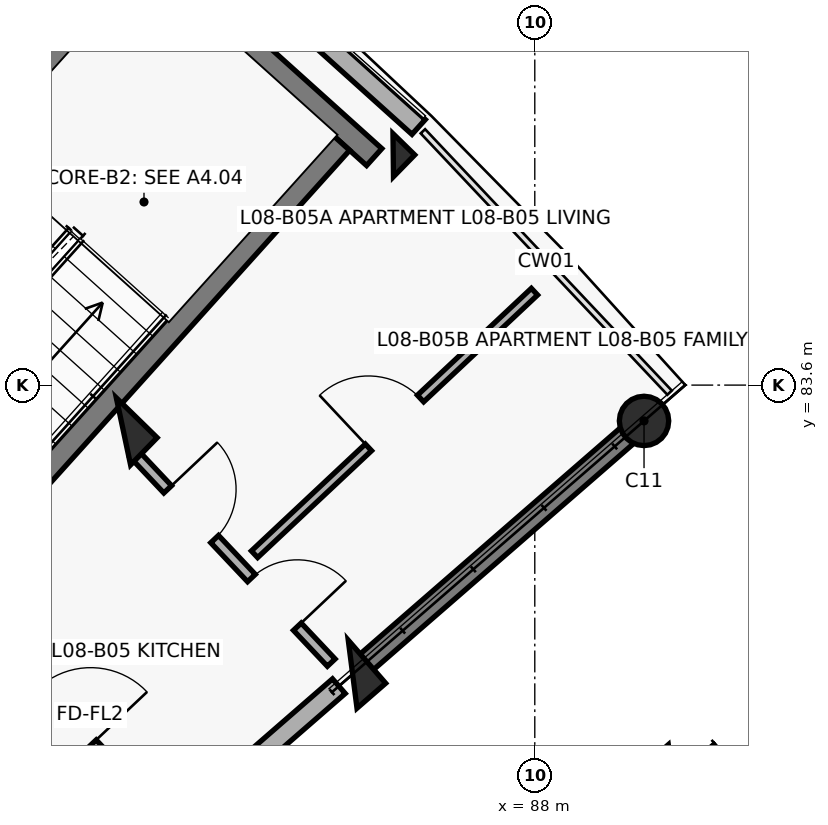
"""IFC4 building model, lengths in metres.
Left out: names, types, materials, properties, quantities, classifications, styles, units other than length and angle.
Written with IfcOpenShell. Run it as: python <this file> out.ifc"""

import sys

from ifc_helpers import new_model, si_unit, direction, frame, frame_2d, origin, origin_2d, place, context, subcontext, project, spatial, rectangle, circle, extrude, element, fill, save


model = new_model("IFC4")
c1 = context("Model", 3, precision=1e-05, world=origin(), true_north=direction((0.0, 1.0)))
c2 = subcontext(c1, "Body", "Model", "MODEL_VIEW")
j1 = project(units=[si_unit("LENGTHUNIT", "METRE"), si_unit("PLANEANGLEUNIT", "RADIAN")], contexts=[c1])
p1 = place(None, origin())
s1 = spatial("IfcSite", under=j1, at=p1, CompositionType="ELEMENT")
p2 = place(p1, origin())
s2 = spatial("IfcBuilding", under=s1, at=p2, CompositionType="ELEMENT")
p3 = place(p2, frame((0.0, 0.0, 26.7)))
s3 = spatial("IfcBuildingStorey", under=s2, at=p3, CompositionType="ELEMENT", Elevation=26.7)
p4 = place(p3, frame((82.588, 82.991, 0.0), z_axis=(0.0, 0.0, 1.0), x_axis=(0.698665066769, 0.715448897181, 0.0)))
e1 = element("IfcColumn", 1, at=p4, inside=s3, PredefinedType="COLUMN", context=c2, shape_type="SweptSolid", body=[
    extrude(rectangle(XDim=0.5, YDim=0.75, at=origin_2d()), origin(), (0.0, 0.0, 1.0), 3.1),
])
p5 = place(p3, frame((86.137, 86.626, 0.0), z_axis=(0.0, 0.0, 1.0), x_axis=(0.698665066769, 0.715448897181, 0.0)))
e2 = element("IfcColumn", 2, at=p5, inside=s3, PredefinedType="COLUMN", context=c2, shape_type="SweptSolid", body=[
    extrude(rectangle(XDim=0.4, YDim=0.4, at=origin_2d()), origin(), (0.0, 0.0, 1.0), 3.1),
])
p6 = place(p3, frame((85.603, 79.796, 0.0), z_axis=(0.0, 0.0, 1.0), x_axis=(0.754709580223, 0.656059028991, 0.0)))
e3 = element("IfcColumn", 3, at=p6, inside=s3, PredefinedType="COLUMN", context=c2, shape_type="SweptSolid", body=[
    extrude(rectangle(XDim=0.5, YDim=0.75, at=origin_2d()), origin(), (0.0, 0.0, 1.0), 3.1),
])
p7 = place(p3, frame((89.437, 83.129, 0.0), z_axis=(0.0, 0.0, 1.0), x_axis=(0.754709580223, 0.656059028991, 0.0)))
e4 = element("IfcColumn", 4, at=p7, inside=s3, PredefinedType="COLUMN", context=c2, shape_type="SweptSolid", body=[
    extrude(circle(Radius=0.325, at=origin_2d()), origin(), (0.0, 0.0, 1.0), 3.1),
])
p8 = place(p3, frame((85.739, 79.914, 0.0), z_axis=(0.0, 0.0, 1.0), x_axis=(0.754703505217, 0.65606601742, 0.0)))
e5 = element("IfcWall", 5, at=p8, inside=s3, PredefinedType="SHEAR", context=c2, shape_type="SweptSolid", body=[
    extrude(rectangle(XDim=4.72, YDim=0.27, at=frame_2d((2.36, 0.0))), origin(), (0.0, 0.0, 1.0), 2.86),
])
p9 = place(p3, frame((89.814, 78.422, 0.0), z_axis=(0.0, 0.0, 1.0), x_axis=(-0.754709580223, -0.656059028991, 0.0)))
e6 = element("IfcColumn", 6, at=p9, inside=s3, PredefinedType="COLUMN", context=c2, shape_type="SweptSolid", body=[
    extrude(rectangle(XDim=0.5, YDim=0.75, at=origin_2d()), origin(), (0.0, 0.0, 1.0), 3.1),
])
p10 = place(p3, frame((82.897, 90.213, 0.0), z_axis=(0.0, 0.0, 1.0), x_axis=(0.743387539862, -0.668860946369, 0.0)))
e7 = element("IfcWall", 7, at=p10, inside=s3, PredefinedType="SOLIDWALL", context=c2, shape_type="SweptSolid", body=[
    extrude(rectangle(XDim=4.809, YDim=0.262, at=frame_2d((2.405, 0.0))), origin(), (0.0, 0.0, 1.0), 2.25),
])
p11 = place(p3, frame((79.234, 74.259, 0.0), z_axis=(0.0, 0.0, 1.0), x_axis=(0.754717680958, 0.656049710044, 0.0)))
e8 = element("IfcWall", 8, at=p11, inside=s3, PredefinedType="SOLIDWALL", context=c2, shape_type="SweptSolid", body=[
    extrude(rectangle(XDim=8.2, YDim=0.255, at=frame_2d((4.1, 0.0))), origin(), (0.0, 0.0, 1.0), 2.18),
])
p12 = place(p11, frame((3.59, 0.0, 0.75)))
e9 = element("IfcOpeningElement", 9, at=p12, cuts=e8, PredefinedType="OPENING", context=c2, shape_type="SweptSolid", body=[
    extrude(rectangle(XDim=1.35, YDim=1.35, at=frame_2d((0.675, 0.675))), frame((0.0, 0.137, 0.0), z_axis=(0.0, -1.0, 0.0), x_axis=(1.0, 0.0, 0.0)), (0.0, 0.0, 1.0), 0.275),
])
p13 = place(p3, frame((85.887, 86.601, 0.0), z_axis=(0.0, 0.0, 1.0), x_axis=(-0.743400052815, 0.668847038922, 0.0)))
e10 = element("IfcWall", 10, at=p13, inside=s3, PredefinedType="SHEAR", context=c2, shape_type="SweptSolid", body=[
    extrude(rectangle(XDim=4.47, YDim=0.3, at=frame_2d((2.235, 0.0))), origin(), (0.0, 0.0, 1.0), 3.1),
])
p14 = place(p3, frame((80.309, 81.073, 0.0), z_axis=(0.0, 0.0, 1.0), x_axis=(0.668885797871, 0.743365179038, 0.0)))
e11 = element("IfcWall", 11, at=p14, inside=s3, PredefinedType="SHEAR", context=c2, shape_type="SweptSolid", body=[
    extrude(rectangle(XDim=7.69, YDim=0.3, at=frame_2d((3.845, 0.0))), origin(), (0.0, 0.0, 1.0), 3.1),
])
p15 = place(p3, frame((77.655, 83.461, 0.0), z_axis=(0.0, 0.0, 1.0), x_axis=(0.668868253964, 0.743380964808, 0.0)))
e12 = element("IfcWall", 12, at=p15, inside=s3, PredefinedType="SHEAR", context=c2, shape_type="SweptSolid", body=[
    extrude(rectangle(XDim=7.69, YDim=0.3, at=frame_2d((3.845, 0.0))), origin(), (0.0, 0.0, 1.0), 3.1),
])
p16 = place(p3, frame((80.628, 80.483, 0.0), z_axis=(0.0, 0.0, 1.0), x_axis=(0.686310507227, -0.727308660522, 0.0)))
e13 = element("IfcWall", 13, at=p16, inside=s3, PredefinedType="SOLIDWALL", context=c2, shape_type="SweptSolid", body=[
    extrude(rectangle(XDim=3.436, YDim=0.2, at=frame_2d((1.718, 0.0))), origin(), (0.0, 0.0, 1.0), 2.08),
])
p17 = place(p16, frame((1.208, 0.0, 0.0)))
e14 = element("IfcOpeningElement", 14, at=p17, cuts=e13, PredefinedType="OPENING", context=c2, shape_type="SweptSolid", body=[
    extrude(rectangle(XDim=1.02, YDim=2.15, at=frame_2d((0.51, 1.075))), frame((0.0, 0.11, 0.0), z_axis=(0.0, -1.0, 0.0), x_axis=(1.0, 0.0, 0.0)), (0.0, 0.0, 1.0), 0.22),
])
p18 = place(p3, frame((82.724, 82.701, 0.0), z_axis=(0.0, 0.0, 1.0), x_axis=(0.686331812627, -0.72728855551, 0.0)))
e15 = element("IfcWall", 15, at=p18, inside=s3, PredefinedType="PARTITIONING", context=c2, shape_type="SweptSolid", body=[
    extrude(rectangle(XDim=3.785, YDim=0.14, at=frame_2d((1.893, 0.0))), origin(), (0.0, 0.0, 1.0), 2.08),
])
p19 = place(p18, frame((0.65, 0.0, 0.0)))
e16 = element("IfcOpeningElement", 16, at=p19, cuts=e15, PredefinedType="OPENING", context=c2, shape_type="SweptSolid", body=[
    extrude(rectangle(XDim=0.9, YDim=2.1, at=frame_2d((0.45, 1.05))), frame((0.0, 0.08, 0.0), z_axis=(0.0, -1.0, 0.0), x_axis=(1.0, 0.0, 0.0)), (0.0, 0.0, 1.0), 0.16),
])
p20 = place(p18, frame((2.255, 0.0, 0.0)))
e17 = element("IfcOpeningElement", 17, at=p20, cuts=e15, PredefinedType="OPENING", context=c2, shape_type="SweptSolid", body=[
    extrude(rectangle(XDim=0.88, YDim=2.1, at=frame_2d((0.44, 1.05))), frame((0.0, 0.08, 0.0), z_axis=(0.0, -1.0, 0.0), x_axis=(1.0, 0.0, 0.0)), (0.0, 0.0, 1.0), 0.16),
])
p21 = place(p3, frame((84.312, 81.375, 0.0), z_axis=(0.0, 0.0, 1.0), x_axis=(0.72936983679, 0.684119610288, 0.0)))
e18 = element("IfcWall", 18, at=p21, inside=s3, PredefinedType="PARTITIONING", context=c2, shape_type="SweptSolid", body=[
    extrude(rectangle(XDim=5.05, YDim=0.12, at=frame_2d((2.525, 0.0))), origin(), (0.0, 0.0, 1.0), 2.08),
])
p22 = place(p21, frame((2.055, 0.0, 0.0)))
e19 = element("IfcOpeningElement", 19, at=p22, cuts=e18, PredefinedType="OPENING", context=c2, shape_type="SweptSolid", body=[
    extrude(rectangle(XDim=0.94, YDim=2.1, at=frame_2d((0.47, 1.05))), frame((0.0, 0.07, 0.0), z_axis=(0.0, -1.0, 0.0), x_axis=(1.0, 0.0, 0.0)), (0.0, 0.0, 1.0), 0.14),
])
p23 = place(p17, origin())
e20 = element("IfcDoor", 20, at=p23, inside=s3, OperationType="SINGLE_SWING_RIGHT", PredefinedType="DOOR", context=c2, shape_type="SweptSolid", body=[
    extrude(rectangle(XDim=1.02, YDim=2.15, at=frame_2d((0.51, 1.075))), frame((0.0, 0.025, 0.0), z_axis=(0.0, -1.0, 0.0), x_axis=(1.0, 0.0, 0.0)), (0.0, 0.0, 1.0), 0.05),
])
fill(e14, e20)
p24 = place(p19, origin())
e21 = element("IfcDoor", 21, at=p24, inside=s3, OperationType="SINGLE_SWING_LEFT", PredefinedType="DOOR", context=c2, shape_type="SweptSolid", body=[
    extrude(rectangle(XDim=0.9, YDim=2.1, at=frame_2d((0.45, 1.05))), frame((0.0, 0.025, 0.0), z_axis=(0.0, -1.0, 0.0), x_axis=(1.0, 0.0, 0.0)), (0.0, 0.0, 1.0), 0.05),
])
fill(e16, e21)
p25 = place(p20, origin())
e22 = element("IfcDoor", 22, at=p25, inside=s3, OperationType="SINGLE_SWING_RIGHT", PredefinedType="DOOR", context=c2, shape_type="SweptSolid", body=[
    extrude(rectangle(XDim=0.88, YDim=2.1, at=frame_2d((0.44, 1.05))), frame((0.0, 0.025, 0.0), z_axis=(0.0, -1.0, 0.0), x_axis=(1.0, 0.0, 0.0)), (0.0, 0.0, 1.0), 0.05),
])
fill(e17, e22)
p26 = place(p22, origin())
e23 = element("IfcDoor", 23, at=p26, inside=s3, OperationType="SINGLE_SWING_LEFT", PredefinedType="DOOR", context=c2, shape_type="SweptSolid", body=[
    extrude(rectangle(XDim=0.94, YDim=2.1, at=frame_2d((0.47, 1.05))), frame((0.0, 0.025, 0.0), z_axis=(0.0, -1.0, 0.0), x_axis=(1.0, 0.0, 0.0)), (0.0, 0.0, 1.0), 0.05),
])
fill(e19, e23)
save(model, sys.argv[1])
